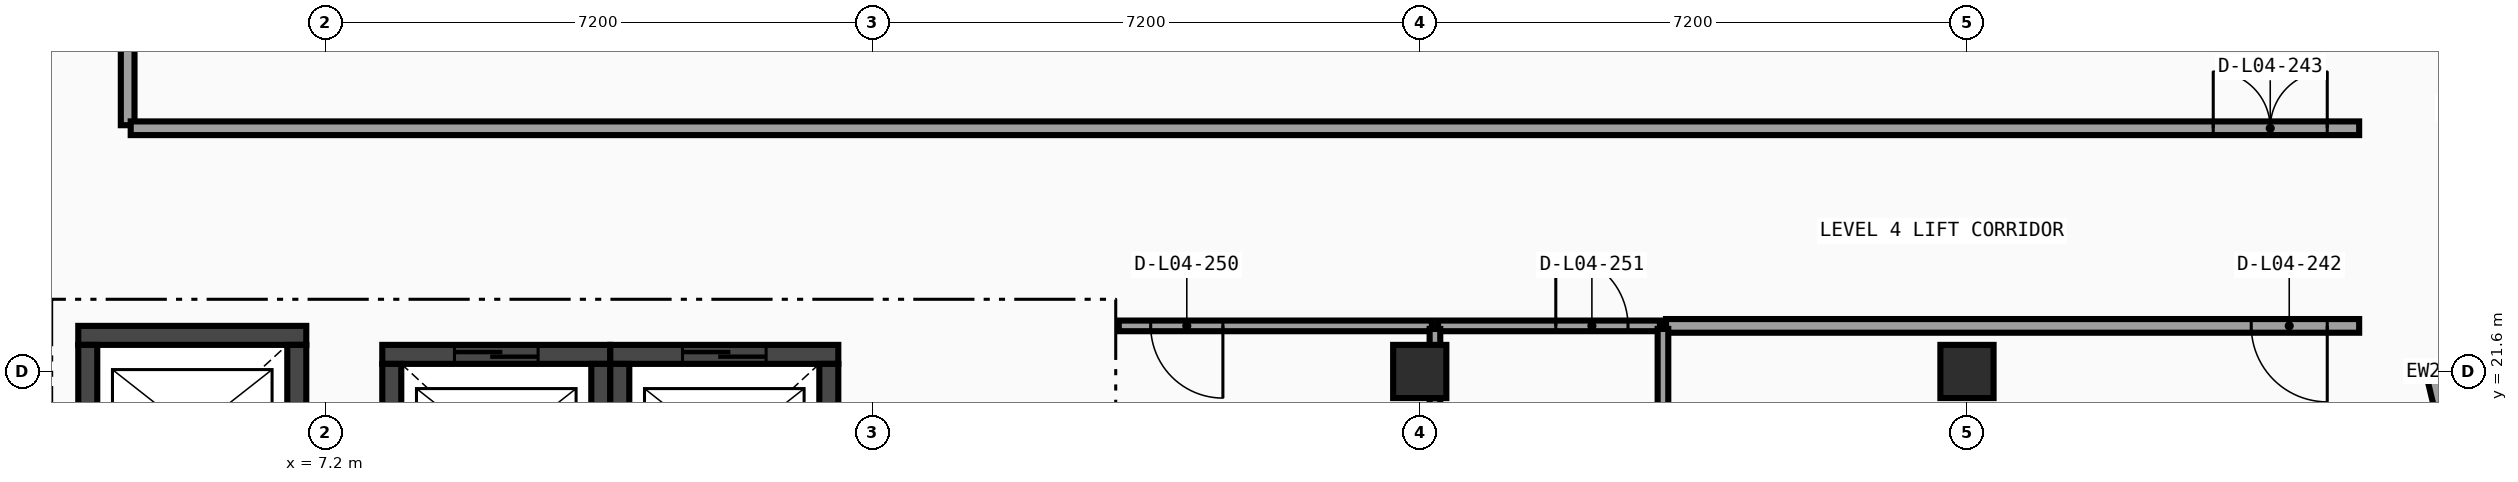
"""IFC4 building model, lengths in metres.
Left out: names, types, materials, properties, quantities, classifications, styles, units other than length and angle.
Written with IfcOpenShell. Run it as: python <this file> out.ifc"""

import sys

from ifc_helpers import new_model, si_unit, direction, frame, frame_2d, origin, origin_2d, place, context, subcontext, project, spatial, rectangle, extrude, element, fill, save


model = new_model("IFC4")
c1 = context("Model", 3, precision=1e-05, world=origin(), true_north=direction((0.0, 1.0)))
c2 = subcontext(c1, "Body", "Model", "MODEL_VIEW")
j1 = project(units=[si_unit("LENGTHUNIT", "METRE"), si_unit("PLANEANGLEUNIT", "RADIAN")], contexts=[c1])
p1 = place(None, origin())
s1 = spatial("IfcSite", under=j1, at=p1, CompositionType="ELEMENT")
p2 = place(p1, origin())
s2 = spatial("IfcBuilding", under=s1, at=p2, CompositionType="ELEMENT")
p3 = place(p2, frame((0.0, 0.0, 18.9)))
s3 = spatial("IfcBuildingStorey", under=s2, at=p3, CompositionType="ELEMENT", Elevation=18.9)
for number, where, z_axis, x_axis in (
    (1, (21.6, 21.6, 0.0), (0.0, 0.0, 1.0), (1.0, 0.0, 0.0)),
    (2, (28.8, 21.6, 0.0), (0.0, 0.0, 1.0), (1.0, 0.0, 0.0)),
):
    element("IfcColumn", number, at=place(p3, frame(where, z_axis=z_axis, x_axis=x_axis)), inside=s3, PredefinedType="COLUMN", context=c2, shape_type="SweptSolid", body=[
        extrude(rectangle(XDim=0.7, YDim=0.7, at=origin_2d()), origin(), (0.0, 0.0, 1.0), 4.05),
    ])
p4 = place(p3, frame((34.998, 21.508, 0.0), z_axis=(0.0, 0.0, 1.0), x_axis=(0.233495818898, -0.972357805829, 0.0)))
e3 = element("IfcWall", 3, at=p4, inside=s3, PredefinedType="SOLIDWALL", context=c2, shape_type="SweptSolid", body=[
    extrude(rectangle(XDim=3.607, YDim=0.28, at=frame_2d((1.804, 0.0))), origin(), (0.0, 0.0, 1.0), 3.8),
])
p5 = place(p4, frame((0.929, 0.0, 0.8)))
e4 = element("IfcOpeningElement", 4, at=p5, cuts=e3, PredefinedType="OPENING", context=c2, shape_type="SweptSolid", body=[
    extrude(rectangle(XDim=1.75, YDim=2.05, at=frame_2d((0.875, 1.025))), frame((0.0, 0.15, 0.0), z_axis=(0.0, -1.0, 0.0), x_axis=(1.0, 0.0, 0.0)), (0.0, 0.0, 1.0), 0.3),
])
p6 = place(p3, frame((34.831, 21.6, 0.0), z_axis=(0.0, 0.0, 1.0), x_axis=(1.0, 0.0, 0.0)))
e5 = element("IfcWall", 5, at=p6, inside=s3, PredefinedType="SOLIDWALL", context=c2, shape_type="SweptSolid", body=[
    extrude(rectangle(XDim=1.019, YDim=0.24, at=frame_2d((0.51, 0.0))), origin(), (0.0, 0.0, 1.0), 3.8),
])
p7 = place(p3, frame((6.95, 22.075, 0.0), z_axis=(0.0, 0.0, 1.0), x_axis=(-1.0, 0.0, 0.0)))
e6 = element("IfcWall", 6, at=p7, inside=s3, PredefinedType="SHEAR", context=c2, shape_type="SweptSolid", body=[
    extrude(rectangle(XDim=3.0, YDim=0.25, at=frame_2d((1.5, 0.0))), origin(), (0.0, 0.0, 1.0), 3.8),
])
for number, where, z_axis, x_axis in (
    (7, (4.075, 21.95, 0.0), (0.0, 0.0, 1.0), (0.0, -1.0, 0.0)),
    (8, (6.825, 19.65, 0.0), (0.0, 0.0, 1.0), (0.0, 1.0, 0.0)),
):
    element("IfcWall", number, at=place(p3, frame(where, z_axis=z_axis, x_axis=x_axis)), inside=s3, PredefinedType="SHEAR", context=c2, shape_type="SweptSolid", body=[
        extrude(rectangle(XDim=2.3, YDim=0.25, at=frame_2d((1.15, 0.0))), origin(), (0.0, 0.0, 1.0), 3.8),
    ])
p8 = place(p3, frame((10.95, 21.825, 0.0), z_axis=(0.0, 0.0, 1.0), x_axis=(-1.0, 0.0, 0.0)))
e9 = element("IfcWall", 9, at=p8, inside=s3, PredefinedType="SHEAR", context=c2, shape_type="SweptSolid", body=[
    extrude(rectangle(XDim=3.0, YDim=0.25, at=frame_2d((1.5, 0.0))), origin(), (0.0, 0.0, 1.0), 3.8),
])
p9 = place(p8, frame((0.95, 0.0, 0.0)))
e10 = element("IfcOpeningElement", 10, at=p9, cuts=e9, PredefinedType="OPENING", context=c2, shape_type="SweptSolid", body=[
    extrude(rectangle(XDim=1.1, YDim=2.1, at=frame_2d((0.55, 1.05))), frame((0.0, 0.135, 0.0), z_axis=(0.0, -1.0, 0.0), x_axis=(1.0, 0.0, 0.0)), (0.0, 0.0, 1.0), 0.27),
])
for number, where, z_axis, x_axis in (
    (11, (8.075, 21.7, 0.0), (0.0, 0.0, 1.0), (0.0, -1.0, 0.0)),
    (12, (10.825, 19.4, 0.0), (0.0, 0.0, 1.0), (0.0, 1.0, 0.0)),
):
    element("IfcWall", number, at=place(p3, frame(where, z_axis=z_axis, x_axis=x_axis)), inside=s3, PredefinedType="SHEAR", context=c2, shape_type="SweptSolid", body=[
        extrude(rectangle(XDim=2.3, YDim=0.25, at=frame_2d((1.15, 0.0))), origin(), (0.0, 0.0, 1.0), 3.8),
    ])
p10 = place(p3, frame((13.95, 21.825, 0.0), z_axis=(0.0, 0.0, 1.0), x_axis=(-1.0, 0.0, 0.0)))
e13 = element("IfcWall", 13, at=p10, inside=s3, PredefinedType="SHEAR", context=c2, shape_type="SweptSolid", body=[
    extrude(rectangle(XDim=3.0, YDim=0.25, at=frame_2d((1.5, 0.0))), origin(), (0.0, 0.0, 1.0), 3.8),
])
p11 = place(p10, frame((0.95, 0.0, 0.0)))
e14 = element("IfcOpeningElement", 14, at=p11, cuts=e13, PredefinedType="OPENING", context=c2, shape_type="SweptSolid", body=[
    extrude(rectangle(XDim=1.1, YDim=2.1, at=frame_2d((0.55, 1.05))), frame((0.0, 0.135, 0.0), z_axis=(0.0, -1.0, 0.0), x_axis=(1.0, 0.0, 0.0)), (0.0, 0.0, 1.0), 0.27),
])
for number, where, z_axis, x_axis in (
    (15, (11.075, 21.7, 0.0), (0.0, 0.0, 1.0), (0.0, -1.0, 0.0)),
    (16, (13.825, 19.4, 0.0), (0.0, 0.0, 1.0), (0.0, 1.0, 0.0)),
):
    element("IfcWall", number, at=place(p3, frame(where, z_axis=z_axis, x_axis=x_axis)), inside=s3, PredefinedType="SHEAR", context=c2, shape_type="SweptSolid", body=[
        extrude(rectangle(XDim=2.3, YDim=0.25, at=frame_2d((1.15, 0.0))), origin(), (0.0, 0.0, 1.0), 3.8),
    ])
p12 = place(p3, frame((4.6, 24.84, 0.0), z_axis=(0.0, 0.0, 1.0), x_axis=(0.0, 1.0, 0.0)))
e17 = element("IfcWall", 17, at=p12, inside=s3, PredefinedType="PARTITIONING", context=c2, shape_type="SweptSolid", body=[
    extrude(rectangle(XDim=10.22, YDim=0.18, at=frame_2d((5.11, 0.0))), origin(), (0.0, 0.0, 1.0), 3.208),
])
p13 = place(p12, frame((6.33, 0.0, 0.0)))
e18 = element("IfcOpeningElement", 18, at=p13, cuts=e17, PredefinedType="OPENING", context=c2, shape_type="SweptSolid", body=[
    extrude(rectangle(XDim=1.5, YDim=2.1, at=frame_2d((0.75, 1.05))), frame((0.0, 0.1, 0.0), z_axis=(0.0, -1.0, 0.0), x_axis=(1.0, 0.0, 0.0)), (0.0, 0.0, 1.0), 0.2),
])
p14 = place(p3, frame((24.84, 22.2, 0.0), z_axis=(0.0, 0.0, 1.0), x_axis=(1.0, 0.0, 0.0)))
e19 = element("IfcWall", 19, at=p14, inside=s3, PredefinedType="PARTITIONING", context=c2, shape_type="SweptSolid", body=[
    extrude(rectangle(XDim=9.12, YDim=0.18, at=frame_2d((4.56, 0.0))), origin(), (0.0, 0.0, 1.0), 3.206),
])
p15 = place(p14, frame((7.7, 0.0, 0.0)))
e20 = element("IfcOpeningElement", 20, at=p15, cuts=e19, PredefinedType="OPENING", context=c2, shape_type="SweptSolid", body=[
    extrude(rectangle(XDim=1.0, YDim=2.1, at=frame_2d((0.5, 1.05))), frame((0.0, 0.1, 0.0), z_axis=(0.0, -1.0, 0.0), x_axis=(1.0, 0.0, 0.0)), (0.0, 0.0, 1.0), 0.2),
])
p16 = place(p3, frame((4.64, 24.8, 0.0), z_axis=(0.0, 0.0, 1.0), x_axis=(1.0, 0.0, 0.0)))
e21 = element("IfcWall", 21, at=p16, inside=s3, PredefinedType="PARTITIONING", context=c2, shape_type="SweptSolid", body=[
    extrude(rectangle(XDim=29.32, YDim=0.18, at=frame_2d((14.66, 0.0))), origin(), (0.0, 0.0, 1.0), 3.206),
])
p17 = place(p16, frame((27.4, 0.0, 0.0)))
e22 = element("IfcOpeningElement", 22, at=p17, cuts=e21, PredefinedType="OPENING", context=c2, shape_type="SweptSolid", body=[
    extrude(rectangle(XDim=1.5, YDim=2.1, at=frame_2d((0.75, 1.05))), frame((0.0, 0.1, 0.0), z_axis=(0.0, -1.0, 0.0), x_axis=(1.0, 0.0, 0.0)), (0.0, 0.0, 1.0), 0.2),
])
p18 = place(p3, frame((17.64, 22.2, 0.0), z_axis=(0.0, 0.0, 1.0), x_axis=(1.0, 0.0, 0.0)))
e23 = element("IfcWall", 23, at=p18, inside=s3, PredefinedType="PARTITIONING", context=c2, shape_type="SweptSolid", body=[
    extrude(rectangle(XDim=4.12, YDim=0.14, at=frame_2d((2.06, 0.0))), origin(), (0.0, 0.0, 1.0), 3.206),
])
p19 = place(p18, frame((0.42, 0.0, 0.0)))
e24 = element("IfcOpeningElement", 24, at=p19, cuts=e23, PredefinedType="OPENING", context=c2, shape_type="SweptSolid", body=[
    extrude(rectangle(XDim=0.95, YDim=2.08, at=frame_2d((0.475, 1.04))), frame((0.0, 0.08, 0.0), z_axis=(0.0, -1.0, 0.0), x_axis=(1.0, 0.0, 0.0)), (0.0, 0.0, 1.0), 0.16),
])
p20 = place(p3, frame((21.84, 22.2, 0.0), z_axis=(0.0, 0.0, 1.0), x_axis=(1.0, 0.0, 0.0)))
e25 = element("IfcWall", 25, at=p20, inside=s3, PredefinedType="PARTITIONING", context=c2, shape_type="SweptSolid", body=[
    extrude(rectangle(XDim=2.92, YDim=0.14, at=frame_2d((1.46, 0.0))), origin(), (0.0, 0.0, 1.0), 3.8),
])
p21 = place(p20, frame((1.55, 0.0, 0.0)))
e26 = element("IfcOpeningElement", 26, at=p21, cuts=e25, PredefinedType="OPENING", context=c2, shape_type="SweptSolid", body=[
    extrude(rectangle(XDim=0.95, YDim=2.08, at=frame_2d((0.475, 1.04))), frame((0.0, 0.08, 0.0), z_axis=(0.0, -1.0, 0.0), x_axis=(1.0, 0.0, 0.0)), (0.0, 0.0, 1.0), 0.16),
])
p22 = place(p3, frame((24.8, 15.04, 0.0), z_axis=(0.0, 0.0, 1.0), x_axis=(0.0, 1.0, 0.0)))
e27 = element("IfcWall", 27, at=p22, inside=s3, PredefinedType="PARTITIONING", context=c2, shape_type="SweptSolid", body=[
    extrude(rectangle(XDim=7.12, YDim=0.14, at=frame_2d((3.56, 0.0))), origin(), (0.0, 0.0, 1.0), 3.208),
])
p23 = place(p3, frame((21.8, 18.44, 0.0), z_axis=(0.0, 0.0, 1.0), x_axis=(0.0, 1.0, 0.0)))
e28 = element("IfcWall", 28, at=p23, inside=s3, PredefinedType="PARTITIONING", context=c2, shape_type="SweptSolid", body=[
    extrude(rectangle(XDim=3.72, YDim=0.14, at=frame_2d((1.86, 0.0))), origin(), (0.0, 0.0, 1.0), 3.206),
])
p24 = place(p9, origin())
e29 = element("IfcDoor", 29, at=p24, inside=s3, OperationType="SLIDING_TO_LEFT", PredefinedType="DOOR", context=c2, shape_type="SweptSolid", body=[
    extrude(rectangle(XDim=1.1, YDim=2.1, at=frame_2d((0.55, 1.05))), frame((0.0, 0.025, 0.0), z_axis=(0.0, -1.0, 0.0), x_axis=(1.0, 0.0, 0.0)), (0.0, 0.0, 1.0), 0.05),
])
fill(e10, e29)
p25 = place(p11, origin())
e30 = element("IfcDoor", 30, at=p25, inside=s3, OperationType="SLIDING_TO_LEFT", PredefinedType="DOOR", context=c2, shape_type="SweptSolid", body=[
    extrude(rectangle(XDim=1.1, YDim=2.1, at=frame_2d((0.55, 1.05))), frame((0.0, 0.025, 0.0), z_axis=(0.0, -1.0, 0.0), x_axis=(1.0, 0.0, 0.0)), (0.0, 0.0, 1.0), 0.05),
])
fill(e14, e30)
p26 = place(p15, origin())
e31 = element("IfcDoor", 31, at=p26, inside=s3, OperationType="SINGLE_SWING_RIGHT", PredefinedType="DOOR", context=c2, shape_type="SweptSolid", body=[
    extrude(rectangle(XDim=1.0, YDim=2.1, at=frame_2d((0.5, 1.05))), frame((0.0, 0.025, 0.0), z_axis=(0.0, -1.0, 0.0), x_axis=(1.0, 0.0, 0.0)), (0.0, 0.0, 1.0), 0.05),
])
fill(e20, e31)
p27 = place(p17, origin())
e32 = element("IfcDoor", 32, at=p27, inside=s3, OperationType="DOUBLE_DOOR_SINGLE_SWING", PredefinedType="DOOR", context=c2, shape_type="SweptSolid", body=[
    extrude(rectangle(XDim=1.5, YDim=2.1, at=frame_2d((0.75, 1.05))), frame((0.0, 0.025, 0.0), z_axis=(0.0, -1.0, 0.0), x_axis=(1.0, 0.0, 0.0)), (0.0, 0.0, 1.0), 0.05),
])
fill(e22, e32)
p28 = place(p19, origin())
e33 = element("IfcDoor", 33, at=p28, inside=s3, OperationType="SINGLE_SWING_RIGHT", PredefinedType="DOOR", context=c2, shape_type="SweptSolid", body=[
    extrude(rectangle(XDim=0.95, YDim=2.08, at=frame_2d((0.475, 1.04))), frame((0.0, 0.025, 0.0), z_axis=(0.0, -1.0, 0.0), x_axis=(1.0, 0.0, 0.0)), (0.0, 0.0, 1.0), 0.05),
])
fill(e24, e33)
p29 = place(p21, origin())
e34 = element("IfcDoor", 34, at=p29, inside=s3, OperationType="SINGLE_SWING_LEFT", PredefinedType="DOOR", context=c2, shape_type="SweptSolid", body=[
    extrude(rectangle(XDim=0.95, YDim=2.08, at=frame_2d((0.475, 1.04))), frame((0.0, 0.025, 0.0), z_axis=(0.0, -1.0, 0.0), x_axis=(1.0, 0.0, 0.0)), (0.0, 0.0, 1.0), 0.05),
])
fill(e26, e34)
save(model, sys.argv[1])
